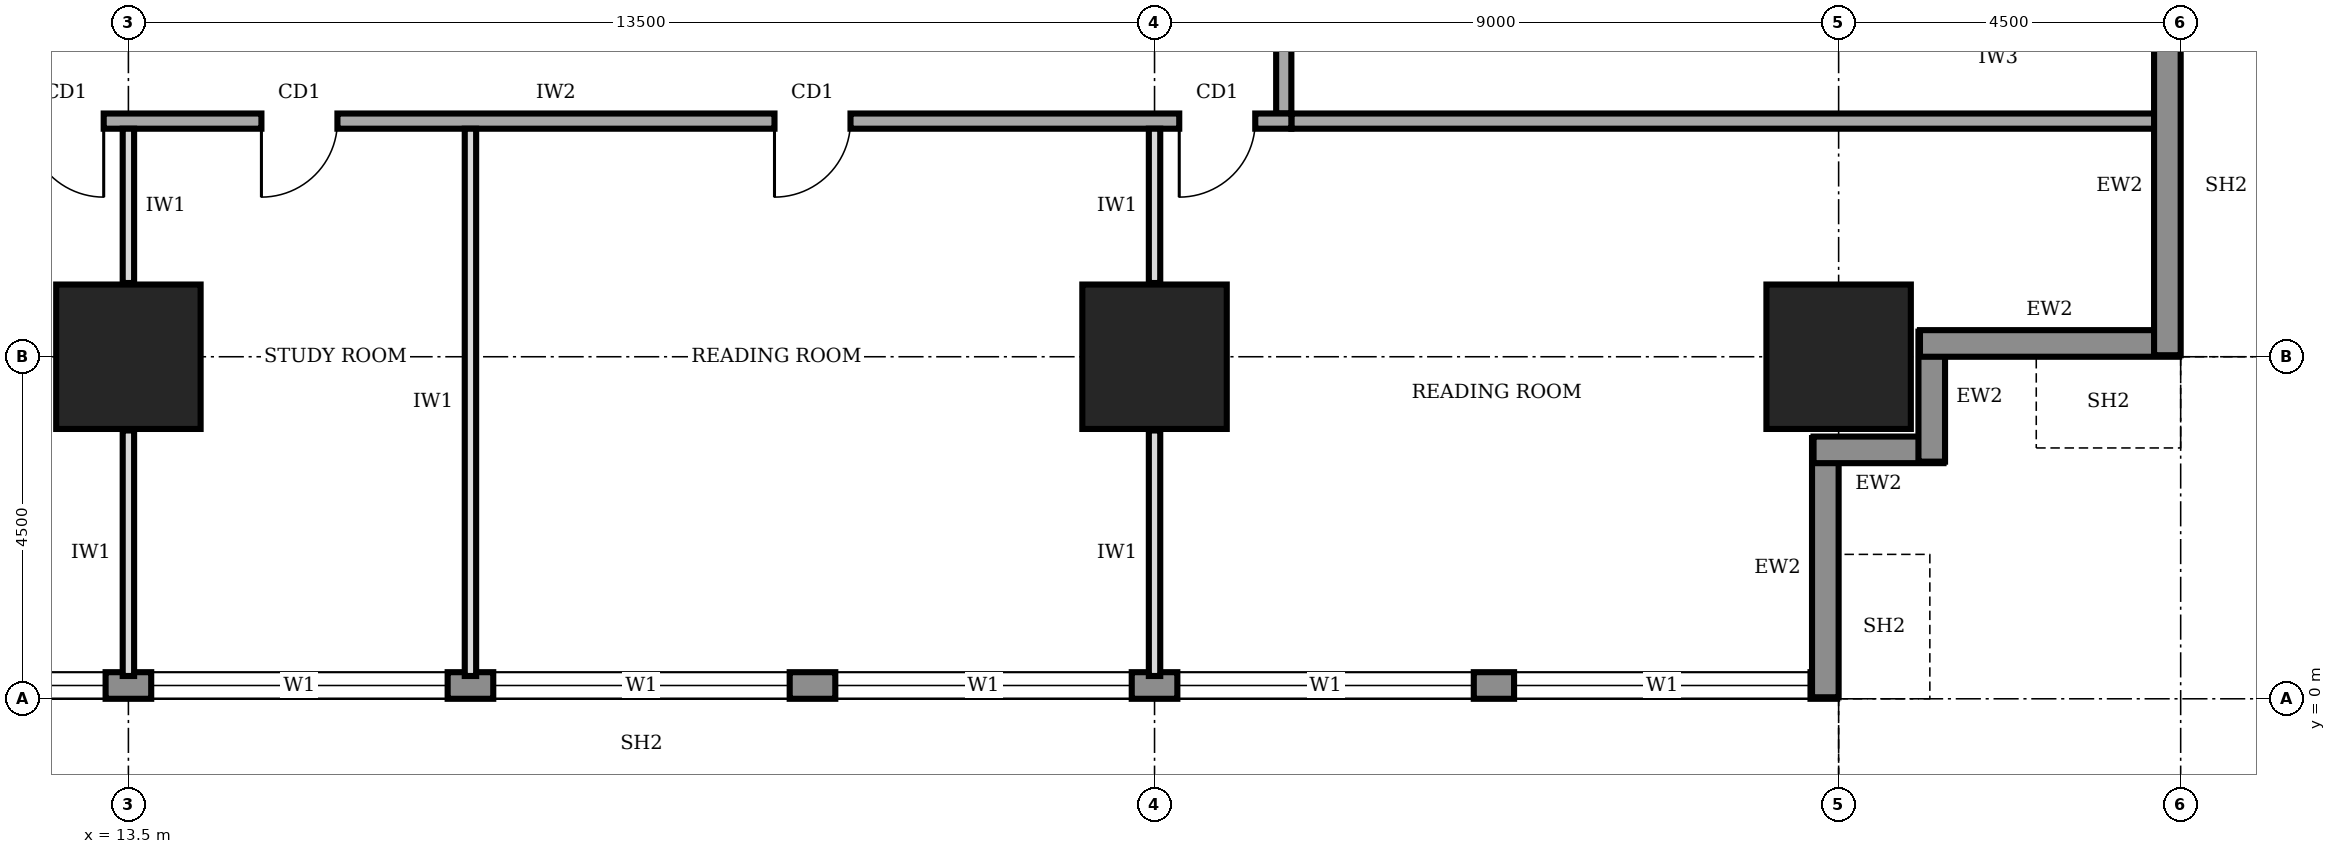
"""IFC4 building model, lengths in metres.
Left out: names, types, materials, properties, quantities, classifications, styles, units other than length and angle.
Written with IfcOpenShell. Run it as: python <this file> out.ifc"""

import sys

from ifc_helpers import new_model, si_unit, direction, frame, frame_2d, origin, origin_2d, place, context, subcontext, project, spatial, rectangle, extrude, element, fill, save


model = new_model("IFC4")
c1 = context("Model", 3, precision=1e-05, world=origin(), true_north=direction((0.0, 1.0)))
c2 = subcontext(c1, "Body", "Model", "MODEL_VIEW")
j1 = project(units=[si_unit("LENGTHUNIT", "METRE"), si_unit("PLANEANGLEUNIT", "RADIAN")], contexts=[c1])
p1 = place(None, origin())
s1 = spatial("IfcSite", under=j1, at=p1, CompositionType="ELEMENT")
p2 = place(p1, origin())
s2 = spatial("IfcBuilding", under=s1, at=p2, CompositionType="ELEMENT")
p3 = place(p2, frame((0.0, 0.0, 133.0)))
s3 = spatial("IfcBuildingStorey", under=s2, at=p3, CompositionType="ELEMENT", Elevation=133.0)
for number, where, z_axis, x_axis in (
    (1, (13.5, 4.5, 0.0), (0.0, 0.0, 1.0), (1.0, 0.0, 0.0)),
    (2, (27.0, 4.5, 0.0), (0.0, 0.0, 1.0), (1.0, 0.0, 0.0)),
    (3, (36.0, 4.5, 0.0), (0.0, 0.0, 1.0), (1.0, 0.0, 0.0)),
):
    element("IfcColumn", number, at=place(p3, frame(where, z_axis=z_axis, x_axis=x_axis)), inside=s3, PredefinedType="COLUMN", context=c2, shape_type="SweptSolid", body=[
        extrude(rectangle(XDim=1.9, YDim=1.9, at=origin_2d()), origin(), (0.0, 0.0, 1.0), 4.0),
    ])
p4 = place(p3, frame((4.52, 0.175, 0.0), z_axis=(0.0, 0.0, 1.0), x_axis=(1.0, 0.0, 0.0)))
e4 = element("IfcWall", 4, at=p4, inside=s3, PredefinedType="STANDARD", context=c2, shape_type="SweptSolid", body=[
    extrude(rectangle(XDim=31.46, YDim=0.35, at=frame_2d((15.73, 0.0))), origin(), (0.0, 0.0, 1.0), 3.75),
])
p5 = place(p4, frame((4.78, 0.0, 0.9)))
e5 = element("IfcOpeningElement", 5, at=p5, cuts=e4, PredefinedType="OPENING", context=c2, shape_type="SweptSolid", body=[
    extrude(rectangle(XDim=3.9, YDim=2.2, at=frame_2d((1.95, 1.1))), frame((0.0, 0.185, 0.0), z_axis=(0.0, -1.0, 0.0), x_axis=(1.0, 0.0, 0.0)), (0.0, 0.0, 1.0), 0.37),
])
p6 = place(p4, frame((9.28, 0.0, 0.9)))
e6 = element("IfcOpeningElement", 6, at=p6, cuts=e4, PredefinedType="OPENING", context=c2, shape_type="SweptSolid", body=[
    extrude(rectangle(XDim=3.9, YDim=2.2, at=frame_2d((1.95, 1.1))), frame((0.0, 0.185, 0.0), z_axis=(0.0, -1.0, 0.0), x_axis=(1.0, 0.0, 0.0)), (0.0, 0.0, 1.0), 0.37),
])
p7 = place(p4, frame((13.78, 0.0, 0.9)))
e7 = element("IfcOpeningElement", 7, at=p7, cuts=e4, PredefinedType="OPENING", context=c2, shape_type="SweptSolid", body=[
    extrude(rectangle(XDim=3.9, YDim=2.2, at=frame_2d((1.95, 1.1))), frame((0.0, 0.185, 0.0), z_axis=(0.0, -1.0, 0.0), x_axis=(1.0, 0.0, 0.0)), (0.0, 0.0, 1.0), 0.37),
])
p8 = place(p4, frame((18.28, 0.0, 0.9)))
e8 = element("IfcOpeningElement", 8, at=p8, cuts=e4, PredefinedType="OPENING", context=c2, shape_type="SweptSolid", body=[
    extrude(rectangle(XDim=3.9, YDim=2.2, at=frame_2d((1.95, 1.1))), frame((0.0, 0.185, 0.0), z_axis=(0.0, -1.0, 0.0), x_axis=(1.0, 0.0, 0.0)), (0.0, 0.0, 1.0), 0.37),
])
p9 = place(p4, frame((22.78, 0.0, 0.9)))
e9 = element("IfcOpeningElement", 9, at=p9, cuts=e4, PredefinedType="OPENING", context=c2, shape_type="SweptSolid", body=[
    extrude(rectangle(XDim=3.9, YDim=2.2, at=frame_2d((1.95, 1.1))), frame((0.0, 0.185, 0.0), z_axis=(0.0, -1.0, 0.0), x_axis=(1.0, 0.0, 0.0)), (0.0, 0.0, 1.0), 0.37),
])
p10 = place(p4, frame((27.21, 0.0, 0.9)))
e10 = element("IfcOpeningElement", 10, at=p10, cuts=e4, PredefinedType="OPENING", context=c2, shape_type="SweptSolid", body=[
    extrude(rectangle(XDim=3.9, YDim=2.2, at=frame_2d((1.95, 1.1))), frame((0.0, 0.185, 0.0), z_axis=(0.0, -1.0, 0.0), x_axis=(1.0, 0.0, 0.0)), (0.0, 0.0, 1.0), 0.37),
])
p11 = place(p3, frame((35.825, 0.02, 0.0), z_axis=(0.0, 0.0, 1.0), x_axis=(0.0, 1.0, 0.0)))
e11 = element("IfcWall", 11, at=p11, inside=s3, PredefinedType="STANDARD", context=c2, shape_type="SweptSolid", body=[
    extrude(rectangle(XDim=3.41, YDim=0.35, at=frame_2d((1.705, 0.0))), origin(), (0.0, 0.0, 1.0), 2.85),
])
for number, where, z_axis, x_axis in (
    (12, (35.67, 3.275, 0.0), (0.0, 0.0, 1.0), (1.0, 0.0, 0.0)),
    (13, (37.225, 3.12, 0.0), (0.0, 0.0, 1.0), (0.0, 1.0, 0.0)),
):
    element("IfcWall", number, at=place(p3, frame(where, z_axis=z_axis, x_axis=x_axis)), inside=s3, PredefinedType="STANDARD", context=c2, shape_type="SweptSolid", body=[
        extrude(rectangle(XDim=1.71, YDim=0.35, at=frame_2d((0.855, 0.0))), origin(), (0.0, 0.0, 1.0), 3.75),
    ])
p12 = place(p3, frame((37.07, 4.675, 0.0), z_axis=(0.0, 0.0, 1.0), x_axis=(1.0, 0.0, 0.0)))
e14 = element("IfcWall", 14, at=p12, inside=s3, PredefinedType="STANDARD", context=c2, shape_type="SweptSolid", body=[
    extrude(rectangle(XDim=3.41, YDim=0.35, at=frame_2d((1.705, 0.0))), origin(), (0.0, 0.0, 1.0), 2.85),
])
p13 = place(p3, frame((40.325, 4.52, 0.0), z_axis=(0.0, 0.0, 1.0), x_axis=(0.0, 1.0, 0.0)))
e15 = element("IfcWall", 15, at=p13, inside=s3, PredefinedType="STANDARD", context=c2, shape_type="SweptSolid", body=[
    extrude(rectangle(XDim=4.46, YDim=0.35, at=frame_2d((2.23, 0.0))), origin(), (0.0, 0.0, 1.0), 3.75),
])
p14 = place(p3, frame((11.9, 7.6, 0.0), z_axis=(0.0, 0.0, 1.0), x_axis=(1.0, 0.0, 0.0)))
e16 = element("IfcWall", 16, at=p14, inside=s3, PredefinedType="SOLIDWALL", context=c2, shape_type="SweptSolid", body=[
    extrude(rectangle(XDim=16.9, YDim=0.2, at=frame_2d((8.45, 0.0))), origin(), (0.0, 0.0, 1.0), 3.75),
])
p15 = place(p14, frame((0.275, 0.0, 0.0)))
e17 = element("IfcOpeningElement", 17, at=p15, cuts=e16, PredefinedType="OPENING", context=c2, shape_type="SweptSolid", body=[
    extrude(rectangle(XDim=1.0, YDim=2.1, at=frame_2d((0.5, 1.05))), frame((0.0, 0.11, 0.0), z_axis=(0.0, -1.0, 0.0), x_axis=(1.0, 0.0, 0.0)), (0.0, 0.0, 1.0), 0.22),
])
p16 = place(p14, frame((3.35, 0.0, 0.0)))
e18 = element("IfcOpeningElement", 18, at=p16, cuts=e16, PredefinedType="OPENING", context=c2, shape_type="SweptSolid", body=[
    extrude(rectangle(XDim=1.0, YDim=2.1, at=frame_2d((0.5, 1.05))), frame((0.0, 0.11, 0.0), z_axis=(0.0, -1.0, 0.0), x_axis=(1.0, 0.0, 0.0)), (0.0, 0.0, 1.0), 0.22),
])
p17 = place(p14, frame((10.1, 0.0, 0.0)))
e19 = element("IfcOpeningElement", 19, at=p17, cuts=e16, PredefinedType="OPENING", context=c2, shape_type="SweptSolid", body=[
    extrude(rectangle(XDim=1.0, YDim=2.1, at=frame_2d((0.5, 1.05))), frame((0.0, 0.11, 0.0), z_axis=(0.0, -1.0, 0.0), x_axis=(1.0, 0.0, 0.0)), (0.0, 0.0, 1.0), 0.22),
])
p18 = place(p14, frame((15.425, 0.0, 0.0)))
e20 = element("IfcOpeningElement", 20, at=p18, cuts=e16, PredefinedType="OPENING", context=c2, shape_type="SweptSolid", body=[
    extrude(rectangle(XDim=1.0, YDim=2.1, at=frame_2d((0.5, 1.05))), frame((0.0, 0.11, 0.0), z_axis=(0.0, -1.0, 0.0), x_axis=(1.0, 0.0, 0.0)), (0.0, 0.0, 1.0), 0.22),
])
p19 = place(p3, frame((28.7, 7.7, 0.0), z_axis=(0.0, 0.0, 1.0), x_axis=(0.0, 1.0, 0.0)))
e21 = element("IfcWall", 21, at=p19, inside=s3, PredefinedType="SOLIDWALL", context=c2, shape_type="SweptSolid", body=[
    extrude(rectangle(XDim=23.8, YDim=0.2, at=frame_2d((11.9, 0.0))), origin(), (0.0, 0.0, 1.0), 3.75),
])
p20 = place(p19, frame((10.9, 0.0, 0.0)))
e22 = element("IfcOpeningElement", 22, at=p20, cuts=e21, PredefinedType="OPENING", context=c2, shape_type="SweptSolid", body=[
    extrude(rectangle(XDim=1.8, YDim=2.1, at=frame_2d((0.9, 1.05))), frame((0.0, 0.11, 0.0), z_axis=(0.0, -1.0, 0.0), x_axis=(1.0, 0.0, 0.0)), (0.0, 0.0, 1.0), 0.22),
])
p21 = place(p3, frame((28.8, 7.6, 0.0), z_axis=(0.0, 0.0, 1.0), x_axis=(1.0, 0.0, 0.0)))
e23 = element("IfcWall", 23, at=p21, inside=s3, PredefinedType="SOLIDWALL", context=c2, shape_type="SweptSolid", body=[
    extrude(rectangle(XDim=11.4, YDim=0.2, at=frame_2d((5.7, 0.0))), origin(), (0.0, 0.0, 1.0), 3.75),
])
p22 = place(p3, frame((13.5, 0.3, 0.0), z_axis=(0.0, 0.0, 1.0), x_axis=(0.0, 1.0, 0.0)))
e24 = element("IfcWall", 24, at=p22, inside=s3, PredefinedType="PARTITIONING", context=c2, shape_type="SweptSolid", body=[
    extrude(rectangle(XDim=3.23, YDim=0.15, at=frame_2d((1.615, 0.0))), origin(), (0.0, 0.0, 1.0), 2.85),
])
p23 = place(p3, frame((13.5, 5.47, 0.0), z_axis=(0.0, 0.0, 1.0), x_axis=(0.0, 1.0, 0.0)))
e25 = element("IfcWall", 25, at=p23, inside=s3, PredefinedType="PARTITIONING", context=c2, shape_type="SweptSolid", body=[
    extrude(rectangle(XDim=2.03, YDim=0.15, at=frame_2d((1.015, 0.0))), origin(), (0.0, 0.0, 1.0), 2.85),
])
p24 = place(p3, frame((18.0, 0.3, 0.0), z_axis=(0.0, 0.0, 1.0), x_axis=(0.0, 1.0, 0.0)))
e26 = element("IfcWall", 26, at=p24, inside=s3, PredefinedType="PARTITIONING", context=c2, shape_type="SweptSolid", body=[
    extrude(rectangle(XDim=7.2, YDim=0.15, at=frame_2d((3.6, 0.0))), origin(), (0.0, 0.0, 1.0), 3.75),
])
p25 = place(p3, frame((27.0, 0.3, 0.0), z_axis=(0.0, 0.0, 1.0), x_axis=(0.0, 1.0, 0.0)))
e27 = element("IfcWall", 27, at=p25, inside=s3, PredefinedType="PARTITIONING", context=c2, shape_type="SweptSolid", body=[
    extrude(rectangle(XDim=3.23, YDim=0.15, at=frame_2d((1.615, 0.0))), origin(), (0.0, 0.0, 1.0), 2.85),
])
p26 = place(p3, frame((27.0, 5.47, 0.0), z_axis=(0.0, 0.0, 1.0), x_axis=(0.0, 1.0, 0.0)))
e28 = element("IfcWall", 28, at=p26, inside=s3, PredefinedType="PARTITIONING", context=c2, shape_type="SweptSolid", body=[
    extrude(rectangle(XDim=2.03, YDim=0.15, at=frame_2d((1.015, 0.0))), origin(), (0.0, 0.0, 1.0), 2.85),
])
p27 = place(p5, origin())
e29 = element("IfcWindow", 29, at=p27, inside=s3, PartitioningType="SINGLE_PANEL", PredefinedType="WINDOW", context=c2, shape_type="SweptSolid", body=[
    extrude(rectangle(XDim=3.9, YDim=2.2, at=frame_2d((1.95, 1.1))), frame((0.0, 0.03, 0.0), z_axis=(0.0, -1.0, 0.0), x_axis=(1.0, 0.0, 0.0)), (0.0, 0.0, 1.0), 0.06),
])
fill(e5, e29)
p28 = place(p6, origin())
e30 = element("IfcWindow", 30, at=p28, inside=s3, PartitioningType="SINGLE_PANEL", PredefinedType="WINDOW", context=c2, shape_type="SweptSolid", body=[
    extrude(rectangle(XDim=3.9, YDim=2.2, at=frame_2d((1.95, 1.1))), frame((0.0, 0.03, 0.0), z_axis=(0.0, -1.0, 0.0), x_axis=(1.0, 0.0, 0.0)), (0.0, 0.0, 1.0), 0.06),
])
fill(e6, e30)
p29 = place(p7, origin())
e31 = element("IfcWindow", 31, at=p29, inside=s3, PartitioningType="SINGLE_PANEL", PredefinedType="WINDOW", context=c2, shape_type="SweptSolid", body=[
    extrude(rectangle(XDim=3.9, YDim=2.2, at=frame_2d((1.95, 1.1))), frame((0.0, 0.03, 0.0), z_axis=(0.0, -1.0, 0.0), x_axis=(1.0, 0.0, 0.0)), (0.0, 0.0, 1.0), 0.06),
])
fill(e7, e31)
p30 = place(p8, origin())
e32 = element("IfcWindow", 32, at=p30, inside=s3, PartitioningType="SINGLE_PANEL", PredefinedType="WINDOW", context=c2, shape_type="SweptSolid", body=[
    extrude(rectangle(XDim=3.9, YDim=2.2, at=frame_2d((1.95, 1.1))), frame((0.0, 0.03, 0.0), z_axis=(0.0, -1.0, 0.0), x_axis=(1.0, 0.0, 0.0)), (0.0, 0.0, 1.0), 0.06),
])
fill(e8, e32)
p31 = place(p9, origin())
e33 = element("IfcWindow", 33, at=p31, inside=s3, PartitioningType="SINGLE_PANEL", PredefinedType="WINDOW", context=c2, shape_type="SweptSolid", body=[
    extrude(rectangle(XDim=3.9, YDim=2.2, at=frame_2d((1.95, 1.1))), frame((0.0, 0.03, 0.0), z_axis=(0.0, -1.0, 0.0), x_axis=(1.0, 0.0, 0.0)), (0.0, 0.0, 1.0), 0.06),
])
fill(e9, e33)
p32 = place(p10, origin())
e34 = element("IfcWindow", 34, at=p32, inside=s3, PartitioningType="SINGLE_PANEL", PredefinedType="WINDOW", context=c2, shape_type="SweptSolid", body=[
    extrude(rectangle(XDim=3.9, YDim=2.2, at=frame_2d((1.95, 1.1))), frame((0.0, 0.03, 0.0), z_axis=(0.0, -1.0, 0.0), x_axis=(1.0, 0.0, 0.0)), (0.0, 0.0, 1.0), 0.06),
])
fill(e10, e34)
p33 = place(p15, frame((1.0, 0.0, 0.0), z_axis=(0.0, 0.0, 1.0), x_axis=(-1.0, 0.0, 0.0)))
e35 = element("IfcDoor", 35, at=p33, inside=s3, OperationType="SINGLE_SWING_LEFT", PredefinedType="DOOR", context=c2, shape_type="SweptSolid", body=[
    extrude(rectangle(XDim=1.0, YDim=2.1, at=frame_2d((0.5, 1.05))), frame((0.0, 0.025, 0.0), z_axis=(0.0, -1.0, 0.0), x_axis=(1.0, 0.0, 0.0)), (0.0, 0.0, 1.0), 0.05),
])
fill(e17, e35)
p34 = place(p16, frame((1.0, 0.0, 0.0), z_axis=(0.0, 0.0, 1.0), x_axis=(-1.0, 0.0, 0.0)))
e36 = element("IfcDoor", 36, at=p34, inside=s3, OperationType="SINGLE_SWING_RIGHT", PredefinedType="DOOR", context=c2, shape_type="SweptSolid", body=[
    extrude(rectangle(XDim=1.0, YDim=2.1, at=frame_2d((0.5, 1.05))), frame((0.0, 0.025, 0.0), z_axis=(0.0, -1.0, 0.0), x_axis=(1.0, 0.0, 0.0)), (0.0, 0.0, 1.0), 0.05),
])
fill(e18, e36)
p35 = place(p17, frame((1.0, 0.0, 0.0), z_axis=(0.0, 0.0, 1.0), x_axis=(-1.0, 0.0, 0.0)))
e37 = element("IfcDoor", 37, at=p35, inside=s3, OperationType="SINGLE_SWING_RIGHT", PredefinedType="DOOR", context=c2, shape_type="SweptSolid", body=[
    extrude(rectangle(XDim=1.0, YDim=2.1, at=frame_2d((0.5, 1.05))), frame((0.0, 0.025, 0.0), z_axis=(0.0, -1.0, 0.0), x_axis=(1.0, 0.0, 0.0)), (0.0, 0.0, 1.0), 0.05),
])
fill(e19, e37)
p36 = place(p18, frame((1.0, 0.0, 0.0), z_axis=(0.0, 0.0, 1.0), x_axis=(-1.0, 0.0, 0.0)))
e38 = element("IfcDoor", 38, at=p36, inside=s3, OperationType="SINGLE_SWING_RIGHT", PredefinedType="DOOR", context=c2, shape_type="SweptSolid", body=[
    extrude(rectangle(XDim=1.0, YDim=2.1, at=frame_2d((0.5, 1.05))), frame((0.0, 0.025, 0.0), z_axis=(0.0, -1.0, 0.0), x_axis=(1.0, 0.0, 0.0)), (0.0, 0.0, 1.0), 0.05),
])
fill(e20, e38)
save(model, sys.argv[1])
